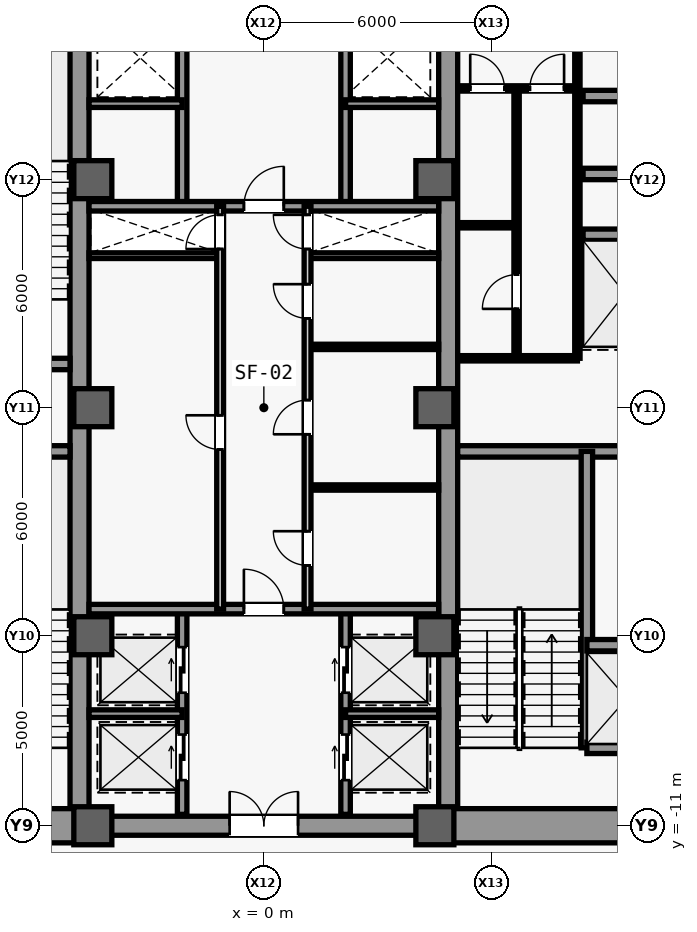
"""IFC4 building model, lengths in metres.
Left out: names, types, materials, properties, quantities, classifications, styles, units other than length and angle.
Written with IfcOpenShell. Run it as: python <this file> out.ifc"""

import sys

from ifc_helpers import new_model, si_unit, direction, frame, frame_2d, origin, origin_2d, place, context, subcontext, project, spatial, rectangle, extrude, source, transform, mapped, element, fill, save


model = new_model("IFC4")
c1 = context("Model", 3, precision=1e-05, world=origin(), true_north=direction((0.0, 1.0)))
c2 = subcontext(c1, "Body", "Model", "MODEL_VIEW")
j1 = project(units=[si_unit("LENGTHUNIT", "METRE"), si_unit("PLANEANGLEUNIT", "RADIAN")], contexts=[c1])
p1 = place(None, origin())
s1 = spatial("IfcSite", under=j1, at=p1, CompositionType="ELEMENT")
p2 = place(p1, origin())
s2 = spatial("IfcBuilding", under=s1, at=p2, CompositionType="ELEMENT")
p3 = place(p2, frame((0.0, 0.0, 17.4)))
s3 = spatial("IfcBuildingStorey", under=s2, at=p3, CompositionType="ELEMENT", Elevation=17.4)
m1 = source(origin(), c2, "Body", "SweptSolid", [
    extrude(rectangle(XDim=21.4, YDim=0.5, at=frame_2d((10.7, 0.0))), origin(), (0.0, 0.0, 1.0), 4.48),
])
for number, where, z_axis, x_axis in (
    (1, (-4.85, -10.7, 0.0), (0.0, 0.0, 1.0), (0.0, 1.0, 0.0)),
    (2, (4.85, -10.7, 0.0), (0.0, 0.0, 1.0), (0.0, 1.0, 0.0)),
):
    element("IfcWall", number, at=place(p3, frame(where, z_axis=z_axis, x_axis=x_axis)), inside=s3, PredefinedType="SHEAR", context=c2, shape_type="MappedRepresentation", body=[
        mapped(m1, transform((0.0, 0.0, 0.0), scale=1.0)),
    ])
m2 = source(origin(), c2, "Body", "SweptSolid", [
    extrude(rectangle(XDim=5.85, YDim=0.9, at=frame_2d((2.925, 0.0))), origin(), (0.0, 0.0, 1.0), 4.48),
])
for number, where, z_axis, x_axis in (
    (3, (-10.7, -11.0, 0.0), (0.0, 0.0, 1.0), (1.0, 0.0, 0.0)),
    (4, (4.85, -11.0, 0.0), (0.0, 0.0, 1.0), (1.0, 0.0, 0.0)),
):
    element("IfcWall", number, at=place(p3, frame(where, z_axis=z_axis, x_axis=x_axis)), inside=s3, PredefinedType="SHEAR", context=c2, shape_type="MappedRepresentation", body=[
        mapped(m2, transform((0.0, 0.0, 0.0), scale=1.0)),
    ])
m3 = source(origin(), c2, "Body", "SweptSolid", [
    extrude(rectangle(XDim=5.6, YDim=0.3, at=frame_2d((2.8, 0.0))), origin(), (0.0, 0.0, 1.0), 4.48),
])
for number, where, z_axis, x_axis in (
    (5, (-10.7, -1.15, 0.0), (0.0, 0.0, 1.0), (1.0, 0.0, 0.0)),
    (6, (-10.7, 1.15, 0.0), (0.0, 0.0, 1.0), (1.0, 0.0, 0.0)),
    (7, (5.1, -1.15, 0.0), (0.0, 0.0, 1.0), (1.0, 0.0, 0.0)),
):
    element("IfcWall", number, at=place(p3, frame(where, z_axis=z_axis, x_axis=x_axis)), inside=s3, PredefinedType="SHEAR", context=c2, shape_type="MappedRepresentation", body=[
        mapped(m3, transform((0.0, 0.0, 0.0), scale=1.0)),
    ])
m4 = source(origin(), c2, "Body", "SweptSolid", [
    extrude(rectangle(XDim=9.2, YDim=0.5, at=frame_2d((4.6, 0.0))), origin(), (0.0, 0.0, 1.0), 4.48),
])
p4 = place(p3, frame((-4.6, -11.0, 0.0), z_axis=(0.0, 0.0, 1.0), x_axis=(1.0, 0.0, 0.0)))
e8 = element("IfcWall", 8, at=p4, inside=s3, PredefinedType="SHEAR", context=c2, shape_type="MappedRepresentation", body=[
    mapped(m4, transform((0.0, 0.0, 0.0), scale=1.0)),
])
m5 = source(origin(), c2, "Body", "SweptSolid", [
    extrude(rectangle(XDim=1.8, YDim=2.25, at=frame_2d((0.9, 1.125))), frame((0.0, 0.26, 0.0), z_axis=(0.0, -1.0, 0.0), x_axis=(1.0, 0.0, 0.0)), (0.0, 0.0, 1.0), 0.52),
])
p5 = place(p4, frame((3.7, 0.0, 0.0)))
e9 = element("IfcOpeningElement", 9, at=p5, cuts=e8, PredefinedType="OPENING", context=c2, shape_type="MappedRepresentation", body=[
    mapped(m5, transform((0.0, 0.0, 0.0), scale=1.0)),
])
m6 = source(origin(), c2, "Body", "SweptSolid", [
    extrude(rectangle(XDim=1.0, YDim=1.0, at=origin_2d()), origin(), (0.0, 0.0, 1.0), 4.8),
])
for number, where, z_axis, x_axis in (
    (10, (-4.5, -11.0, 0.0), (0.0, 0.0, 1.0), (1.0, 0.0, 0.0)),
    (11, (-4.5, -6.0, 0.0), (0.0, 0.0, 1.0), (1.0, 0.0, 0.0)),
    (12, (-4.5, 0.0, 0.0), (0.0, 0.0, 1.0), (1.0, 0.0, 0.0)),
    (13, (-4.5, 6.0, 0.0), (0.0, 0.0, 1.0), (1.0, 0.0, 0.0)),
    (14, (4.5, -11.0, 0.0), (0.0, 0.0, 1.0), (1.0, 0.0, 0.0)),
    (15, (4.5, -6.0, 0.0), (0.0, 0.0, 1.0), (1.0, 0.0, 0.0)),
    (16, (4.5, 0.0, 0.0), (0.0, 0.0, 1.0), (1.0, 0.0, 0.0)),
    (17, (4.5, 6.0, 0.0), (0.0, 0.0, 1.0), (1.0, 0.0, 0.0)),
):
    element("IfcColumn", number, at=place(p3, frame(where, z_axis=z_axis, x_axis=x_axis)), inside=s3, PredefinedType="COLUMN", context=c2, shape_type="MappedRepresentation", body=[
        mapped(m6, transform((0.0, 0.0, 0.0), scale=1.0)),
    ])
m7 = source(origin(), c2, "Body", "SweptSolid", [
    extrude(rectangle(XDim=7.8, YDim=0.3, at=frame_2d((3.9, 0.0))), origin(), (0.0, 0.0, 1.0), 4.48),
])
p6 = place(p3, frame((8.5, -8.95, 0.0), z_axis=(0.0, 0.0, 1.0), x_axis=(0.0, 1.0, 0.0)))
e18 = element("IfcWall", 18, at=p6, inside=s3, PredefinedType="SHEAR", context=c2, shape_type="MappedRepresentation", body=[
    mapped(m7, transform((0.0, 0.0, 0.0), scale=1.0)),
])
m8 = source(origin(), c2, "Body", "SweptSolid", [
    extrude(rectangle(XDim=2.2, YDim=0.3, at=frame_2d((1.1, 0.0))), origin(), (0.0, 0.0, 1.0), 4.48),
])
for number, where, z_axis, x_axis in (
    (19, (8.5, -8.95, 0.0), (0.0, 0.0, 1.0), (1.0, 0.0, 0.0)),
    (20, (8.5, -6.25, 0.0), (0.0, 0.0, 1.0), (1.0, 0.0, 0.0)),
):
    element("IfcWall", number, at=place(p3, frame(where, z_axis=z_axis, x_axis=x_axis)), inside=s3, PredefinedType="SHEAR", context=c2, shape_type="MappedRepresentation", body=[
        mapped(m8, transform((0.0, 0.0, 0.0), scale=1.0)),
    ])
m9 = source(origin(), c2, "Body", "SweptSolid", [
    extrude(rectangle(XDim=2.3, YDim=0.3, at=frame_2d((1.15, 0.0))), origin(), (0.0, 0.0, 1.0), 4.48),
])
for number, where, z_axis, x_axis in (
    (21, (8.4, 4.55, 0.0), (0.0, 0.0, 1.0), (1.0, 0.0, 0.0)),
    (22, (8.4, 6.15, 0.0), (0.0, 0.0, 1.0), (1.0, 0.0, 0.0)),
    (23, (8.4, 8.2, 0.0), (0.0, 0.0, 1.0), (1.0, 0.0, 0.0)),
):
    element("IfcWall", number, at=place(p3, frame(where, z_axis=z_axis, x_axis=x_axis)), inside=s3, PredefinedType="SHEAR", context=c2, shape_type="MappedRepresentation", body=[
        mapped(m9, transform((0.0, 0.0, 0.0), scale=1.0)),
    ])
m10 = source(origin(), c2, "Body", "SweptSolid", [
    extrude(rectangle(XDim=9.4, YDim=0.14, at=frame_2d((4.7, 0.0))), origin(), (0.0, 0.0, 1.0), 4.48),
])
p7 = place(p3, frame((8.25, 1.3, 0.0), z_axis=(0.0, 0.0, 1.0), x_axis=(0.0, 1.0, 0.0)))
e24 = element("IfcWall", 24, at=p7, inside=s3, PredefinedType="PARTITIONING", context=c2, shape_type="MappedRepresentation", body=[
    mapped(m10, transform((0.0, 0.0, 0.0), scale=1.0)),
])
m11 = source(origin(), c2, "Body", "SweptSolid", [
    extrude(rectangle(XDim=3.15, YDim=0.14, at=frame_2d((1.575, 0.0))), origin(), (0.0, 0.0, 1.0), 4.48),
])
p8 = place(p3, frame((5.1, 1.3, 0.0), z_axis=(0.0, 0.0, 1.0), x_axis=(1.0, 0.0, 0.0)))
e25 = element("IfcWall", 25, at=p8, inside=s3, PredefinedType="PARTITIONING", context=c2, shape_type="MappedRepresentation", body=[
    mapped(m11, transform((0.0, 0.0, 0.0), scale=1.0)),
])
p9 = place(p3, frame((5.1, 8.4, 0.0), z_axis=(0.0, 0.0, 1.0), x_axis=(1.0, 0.0, 0.0)))
e26 = element("IfcWall", 26, at=p9, inside=s3, PredefinedType="PARTITIONING", context=c2, shape_type="MappedRepresentation", body=[
    mapped(m11, transform((0.0, 0.0, 0.0), scale=1.0)),
])
m12 = source(origin(), c2, "Body", "SweptSolid", [
    extrude(rectangle(XDim=0.9, YDim=2.15, at=frame_2d((0.45, 1.075))), frame((0.0, 0.08, 0.0), z_axis=(0.0, -1.0, 0.0), x_axis=(1.0, 0.0, 0.0)), (0.0, 0.0, 1.0), 0.16),
])
p10 = place(p9, frame((0.33, 0.0, 0.0)))
e27 = element("IfcOpeningElement", 27, at=p10, cuts=e26, PredefinedType="OPENING", context=c2, shape_type="MappedRepresentation", body=[
    mapped(m12, transform((0.0, 0.0, 0.0), scale=1.0)),
])
p11 = place(p9, frame((1.9, 0.0, 0.0)))
e28 = element("IfcOpeningElement", 28, at=p11, cuts=e26, PredefinedType="OPENING", context=c2, shape_type="MappedRepresentation", body=[
    mapped(m12, transform((0.0, 0.0, 0.0), scale=1.0)),
])
m13 = source(origin(), c2, "Body", "SweptSolid", [
    extrude(rectangle(XDim=7.1, YDim=0.14, at=frame_2d((3.55, 0.0))), origin(), (0.0, 0.0, 1.0), 4.48),
])
p12 = place(p3, frame((6.65, 1.3, 0.0), z_axis=(0.0, 0.0, 1.0), x_axis=(0.0, 1.0, 0.0)))
e29 = element("IfcWall", 29, at=p12, inside=s3, PredefinedType="PARTITIONING", context=c2, shape_type="MappedRepresentation", body=[
    mapped(m13, transform((0.0, 0.0, 0.0), scale=1.0)),
])
p13 = place(p12, frame((1.3, 0.0, 0.0)))
e30 = element("IfcOpeningElement", 30, at=p13, cuts=e29, PredefinedType="OPENING", context=c2, shape_type="MappedRepresentation", body=[
    mapped(m12, transform((0.0, 0.0, 0.0), scale=1.0)),
])
m14 = source(origin(), c2, "Body", "SweptSolid", [
    extrude(rectangle(XDim=1.55, YDim=0.14, at=frame_2d((0.775, 0.0))), origin(), (0.0, 0.0, 1.0), 4.48),
])
p14 = place(p3, frame((5.1, 4.8, 0.0), z_axis=(0.0, 0.0, 1.0), x_axis=(1.0, 0.0, 0.0)))
e31 = element("IfcWall", 31, at=p14, inside=s3, PredefinedType="PARTITIONING", context=c2, shape_type="MappedRepresentation", body=[
    mapped(m14, transform((0.0, 0.0, 0.0), scale=1.0)),
])
m15 = source(origin(), c2, "Body", "SweptSolid", [
    extrude(rectangle(XDim=3.45, YDim=0.15, at=frame_2d((1.725, 0.0))), origin(), (0.0, 0.0, 1.0), 4.48),
])
for number, where, z_axis, x_axis in (
    (32, (-4.6, 4.0, 0.0), (0.0, 0.0, 1.0), (1.0, 0.0, 0.0)),
    (33, (1.15, 4.0, 0.0), (0.0, 0.0, 1.0), (1.0, 0.0, 0.0)),
):
    element("IfcWall", number, at=place(p3, frame(where, z_axis=z_axis, x_axis=x_axis)), inside=s3, PredefinedType="PARTITIONING", context=c2, shape_type="MappedRepresentation", body=[
        mapped(m15, transform((0.0, 0.0, 0.0), scale=1.0)),
    ])
m16 = source(origin(), c2, "Body", "SweptSolid", [
    extrude(rectangle(XDim=5.4, YDim=0.25, at=frame_2d((2.7, 0.0))), origin(), (0.0, 0.0, 1.0), 4.48),
])
p15 = place(p3, frame((-2.15, -10.7, 0.0), z_axis=(0.0, 0.0, 1.0), x_axis=(0.0, 1.0, 0.0)))
e34 = element("IfcWall", 34, at=p15, inside=s3, PredefinedType="SHEAR", context=c2, shape_type="MappedRepresentation", body=[
    mapped(m16, transform((0.0, 0.0, 0.0), scale=1.0)),
])
m17 = source(origin(), c2, "Body", "SweptSolid", [
    extrude(rectangle(XDim=1.2, YDim=2.3, at=frame_2d((0.6, 1.15))), frame((0.0, 0.135, 0.0), z_axis=(0.0, -1.0, 0.0), x_axis=(1.0, 0.0, 0.0)), (0.0, 0.0, 1.0), 0.27),
])
p16 = place(p15, frame((0.9, 0.0, 0.0)))
e35 = element("IfcOpeningElement", 35, at=p16, cuts=e34, PredefinedType="OPENING", context=c2, shape_type="MappedRepresentation", body=[
    mapped(m17, transform((0.0, 0.0, 0.0), scale=1.0)),
])
p17 = place(p15, frame((3.2, 0.0, 0.0)))
e36 = element("IfcOpeningElement", 36, at=p17, cuts=e34, PredefinedType="OPENING", context=c2, shape_type="MappedRepresentation", body=[
    mapped(m17, transform((0.0, 0.0, 0.0), scale=1.0)),
])
p18 = place(p3, frame((2.15, -10.7, 0.0), z_axis=(0.0, 0.0, 1.0), x_axis=(0.0, 1.0, 0.0)))
e37 = element("IfcWall", 37, at=p18, inside=s3, PredefinedType="SHEAR", context=c2, shape_type="MappedRepresentation", body=[
    mapped(m16, transform((0.0, 0.0, 0.0), scale=1.0)),
])
p19 = place(p18, frame((0.9, 0.0, 0.0)))
e38 = element("IfcOpeningElement", 38, at=p19, cuts=e37, PredefinedType="OPENING", context=c2, shape_type="MappedRepresentation", body=[
    mapped(m17, transform((0.0, 0.0, 0.0), scale=1.0)),
])
p20 = place(p18, frame((3.2, 0.0, 0.0)))
e39 = element("IfcOpeningElement", 39, at=p20, cuts=e37, PredefinedType="OPENING", context=c2, shape_type="MappedRepresentation", body=[
    mapped(m17, transform((0.0, 0.0, 0.0), scale=1.0)),
])
m18 = source(origin(), c2, "Body", "SweptSolid", [
    extrude(rectangle(XDim=2.45, YDim=0.2, at=frame_2d((1.225, 0.0))), origin(), (0.0, 0.0, 1.0), 4.48),
])
for number, where, z_axis, x_axis in (
    (40, (-4.6, -8.05, 0.0), (0.0, 0.0, 1.0), (1.0, 0.0, 0.0)),
    (41, (2.15, -8.05, 0.0), (0.0, 0.0, 1.0), (1.0, 0.0, 0.0)),
):
    element("IfcWall", number, at=place(p3, frame(where, z_axis=z_axis, x_axis=x_axis)), inside=s3, PredefinedType="SHEAR", context=c2, shape_type="MappedRepresentation", body=[
        mapped(m18, transform((0.0, 0.0, 0.0), scale=1.0)),
    ])
m19 = source(origin(), c2, "Body", "SweptSolid", [
    extrude(rectangle(XDim=9.2, YDim=0.25, at=frame_2d((4.6, 0.0))), origin(), (0.0, 0.0, 1.0), 4.48),
])
p21 = place(p3, frame((-4.6, -5.3, 0.0), z_axis=(0.0, 0.0, 1.0), x_axis=(1.0, 0.0, 0.0)))
e42 = element("IfcWall", 42, at=p21, inside=s3, PredefinedType="SHEAR", context=c2, shape_type="MappedRepresentation", body=[
    mapped(m19, transform((0.0, 0.0, 0.0), scale=1.0)),
])
m20 = source(origin(), c2, "Body", "SweptSolid", [
    extrude(rectangle(XDim=1.05, YDim=2.2, at=frame_2d((0.525, 1.1))), frame((0.0, 0.135, 0.0), z_axis=(0.0, -1.0, 0.0), x_axis=(1.0, 0.0, 0.0)), (0.0, 0.0, 1.0), 0.27),
])
p22 = place(p21, frame((4.075, 0.0, 0.0)))
e43 = element("IfcOpeningElement", 43, at=p22, cuts=e42, PredefinedType="OPENING", context=c2, shape_type="MappedRepresentation", body=[
    mapped(m20, transform((0.0, 0.0, 0.0), scale=1.0)),
])
for number, where, z_axis, x_axis in (
    (44, (-2.15, 5.3, 0.0), (0.0, 0.0, 1.0), (0.0, 1.0, 0.0)),
    (45, (2.15, 5.3, 0.0), (0.0, 0.0, 1.0), (0.0, 1.0, 0.0)),
):
    element("IfcWall", number, at=place(p3, frame(where, z_axis=z_axis, x_axis=x_axis)), inside=s3, PredefinedType="SHEAR", context=c2, shape_type="MappedRepresentation", body=[
        mapped(m16, transform((0.0, 0.0, 0.0), scale=1.0)),
    ])
for number, where, z_axis, x_axis in (
    (46, (-4.6, 8.0, 0.0), (0.0, 0.0, 1.0), (1.0, 0.0, 0.0)),
    (47, (2.15, 8.0, 0.0), (0.0, 0.0, 1.0), (1.0, 0.0, 0.0)),
):
    element("IfcWall", number, at=place(p3, frame(where, z_axis=z_axis, x_axis=x_axis)), inside=s3, PredefinedType="SHEAR", context=c2, shape_type="MappedRepresentation", body=[
        mapped(m18, transform((0.0, 0.0, 0.0), scale=1.0)),
    ])
p23 = place(p3, frame((-4.6, 5.3, 0.0), z_axis=(0.0, 0.0, 1.0), x_axis=(1.0, 0.0, 0.0)))
e48 = element("IfcWall", 48, at=p23, inside=s3, PredefinedType="SHEAR", context=c2, shape_type="MappedRepresentation", body=[
    mapped(m19, transform((0.0, 0.0, 0.0), scale=1.0)),
])
p24 = place(p23, frame((4.075, 0.0, 0.0)))
e49 = element("IfcOpeningElement", 49, at=p24, cuts=e48, PredefinedType="OPENING", context=c2, shape_type="MappedRepresentation", body=[
    mapped(m20, transform((0.0, 0.0, 0.0), scale=1.0)),
])
m21 = source(origin(), c2, "Body", "SweptSolid", [
    extrude(rectangle(XDim=10.6, YDim=0.18, at=frame_2d((5.3, 0.0))), origin(), (0.0, 0.0, 1.0), 4.48),
])
p25 = place(p3, frame((-1.15, -5.3, 0.0), z_axis=(0.0, 0.0, 1.0), x_axis=(0.0, 1.0, 0.0)))
e50 = element("IfcWall", 50, at=p25, inside=s3, PredefinedType="PARTITIONING", context=c2, shape_type="MappedRepresentation", body=[
    mapped(m21, transform((0.0, 0.0, 0.0), scale=1.0)),
])
m22 = source(origin(), c2, "Body", "SweptSolid", [
    extrude(rectangle(XDim=0.9, YDim=2.15, at=frame_2d((0.45, 1.075))), frame((0.0, 0.1, 0.0), z_axis=(0.0, -1.0, 0.0), x_axis=(1.0, 0.0, 0.0)), (0.0, 0.0, 1.0), 0.2),
])
p26 = place(p25, frame((4.2, 0.0, 0.0)))
e51 = element("IfcOpeningElement", 51, at=p26, cuts=e50, PredefinedType="OPENING", context=c2, shape_type="MappedRepresentation", body=[
    mapped(m22, transform((0.0, 0.0, 0.0), scale=1.0)),
])
p27 = place(p25, frame((9.475, 0.0, 0.0)))
e52 = element("IfcOpeningElement", 52, at=p27, cuts=e50, PredefinedType="OPENING", context=c2, shape_type="MappedRepresentation", body=[
    mapped(m22, transform((0.0, 0.0, 0.0), scale=1.0)),
])
m23 = source(origin(), c2, "Body", "SweptSolid", [
    extrude(rectangle(XDim=3.45, YDim=0.14, at=frame_2d((1.725, 0.0))), origin(), (0.0, 0.0, 1.0), 4.48),
])
for number, where, z_axis, x_axis in (
    (53, (1.15, -2.1, 0.0), (0.0, 0.0, 1.0), (1.0, 0.0, 0.0)),
    (54, (1.15, 1.6, 0.0), (0.0, 0.0, 1.0), (1.0, 0.0, 0.0)),
):
    element("IfcWall", number, at=place(p3, frame(where, z_axis=z_axis, x_axis=x_axis)), inside=s3, PredefinedType="PARTITIONING", context=c2, shape_type="MappedRepresentation", body=[
        mapped(m23, transform((0.0, 0.0, 0.0), scale=1.0)),
    ])
p28 = place(p3, frame((1.15, -5.3, 0.0), z_axis=(0.0, 0.0, 1.0), x_axis=(0.0, 1.0, 0.0)))
e55 = element("IfcWall", 55, at=p28, inside=s3, PredefinedType="PARTITIONING", context=c2, shape_type="MappedRepresentation", body=[
    mapped(m21, transform((0.0, 0.0, 0.0), scale=1.0)),
])
p29 = place(p28, frame((1.15, 0.0, 0.0)))
e56 = element("IfcOpeningElement", 56, at=p29, cuts=e55, PredefinedType="OPENING", context=c2, shape_type="MappedRepresentation", body=[
    mapped(m22, transform((0.0, 0.0, 0.0), scale=1.0)),
])
p30 = place(p28, frame((4.6, 0.0, 0.0)))
e57 = element("IfcOpeningElement", 57, at=p30, cuts=e55, PredefinedType="OPENING", context=c2, shape_type="MappedRepresentation", body=[
    mapped(m22, transform((0.0, 0.0, 0.0), scale=1.0)),
])
p31 = place(p28, frame((7.65, 0.0, 0.0)))
e58 = element("IfcOpeningElement", 58, at=p31, cuts=e55, PredefinedType="OPENING", context=c2, shape_type="MappedRepresentation", body=[
    mapped(m22, transform((0.0, 0.0, 0.0), scale=1.0)),
])
p32 = place(p28, frame((9.475, 0.0, 0.0)))
e59 = element("IfcOpeningElement", 59, at=p32, cuts=e55, PredefinedType="OPENING", context=c2, shape_type="MappedRepresentation", body=[
    mapped(m22, transform((0.0, 0.0, 0.0), scale=1.0)),
])
m24 = source(origin(), c2, "Body", "SweptSolid", [
    extrude(rectangle(XDim=0.9, YDim=2.15, at=frame_2d((0.45, 1.075))), frame((0.0, 0.025, 0.0), z_axis=(0.0, -1.0, 0.0), x_axis=(1.0, 0.0, 0.0)), (0.0, 0.0, 1.0), 0.05),
])
p33 = place(p10, origin())
e60 = element("IfcDoor", 60, at=p33, inside=s3, OperationType="SINGLE_SWING_LEFT", PredefinedType="DOOR", context=c2, shape_type="MappedRepresentation", body=[
    mapped(m24, transform((0.0, 0.0, 0.0), scale=1.0)),
])
fill(e27, e60)
p34 = place(p11, origin())
e61 = element("IfcDoor", 61, at=p34, inside=s3, OperationType="SINGLE_SWING_RIGHT", PredefinedType="DOOR", context=c2, shape_type="MappedRepresentation", body=[
    mapped(m24, transform((0.0, 0.0, 0.0), scale=1.0)),
])
fill(e28, e61)
p35 = place(p13, origin())
e62 = element("IfcDoor", 62, at=p35, inside=s3, OperationType="SINGLE_SWING_LEFT", PredefinedType="DOOR", context=c2, shape_type="MappedRepresentation", body=[
    mapped(m24, transform((0.0, 0.0, 0.0), scale=1.0)),
])
fill(e30, e62)
m25 = source(origin(), c2, "Body", "SweptSolid", [
    extrude(rectangle(XDim=1.05, YDim=2.2, at=frame_2d((0.525, 1.1))), frame((0.0, 0.025, 0.0), z_axis=(0.0, -1.0, 0.0), x_axis=(1.0, 0.0, 0.0)), (0.0, 0.0, 1.0), 0.05),
])
p36 = place(p22, origin())
e63 = element("IfcDoor", 63, at=p36, inside=s3, OperationType="SINGLE_SWING_LEFT", PredefinedType="DOOR", context=c2, shape_type="MappedRepresentation", body=[
    mapped(m25, transform((0.0, 0.0, 0.0), scale=1.0)),
])
fill(e43, e63)
m26 = source(origin(), c2, "Body", "SweptSolid", [
    extrude(rectangle(XDim=1.8, YDim=2.25, at=frame_2d((0.9, 1.125))), frame((0.0, 0.025, 0.0), z_axis=(0.0, -1.0, 0.0), x_axis=(1.0, 0.0, 0.0)), (0.0, 0.0, 1.0), 0.05),
])
p37 = place(p5, origin())
e64 = element("IfcDoor", 64, at=p37, inside=s3, OperationType="SINGLE_SWING_LEFT", PredefinedType="DOOR", context=c2, shape_type="MappedRepresentation", body=[
    mapped(m26, transform((0.0, 0.0, 0.0), scale=1.0)),
])
fill(e9, e64)
p38 = place(p24, origin())
e65 = element("IfcDoor", 65, at=p38, inside=s3, OperationType="SINGLE_SWING_RIGHT", PredefinedType="DOOR", context=c2, shape_type="MappedRepresentation", body=[
    mapped(m25, transform((0.0, 0.0, 0.0), scale=1.0)),
])
fill(e49, e65)
p39 = place(p26, origin())
e66 = element("IfcDoor", 66, at=p39, inside=s3, OperationType="SINGLE_SWING_RIGHT", PredefinedType="DOOR", context=c2, shape_type="MappedRepresentation", body=[
    mapped(m24, transform((0.0, 0.0, 0.0), scale=1.0)),
])
fill(e51, e66)
p40 = place(p29, origin())
e67 = element("IfcDoor", 67, at=p40, inside=s3, OperationType="SINGLE_SWING_RIGHT", PredefinedType="DOOR", context=c2, shape_type="MappedRepresentation", body=[
    mapped(m24, transform((0.0, 0.0, 0.0), scale=1.0)),
])
fill(e56, e67)
p41 = place(p30, origin())
e68 = element("IfcDoor", 68, at=p41, inside=s3, OperationType="SINGLE_SWING_LEFT", PredefinedType="DOOR", context=c2, shape_type="MappedRepresentation", body=[
    mapped(m24, transform((0.0, 0.0, 0.0), scale=1.0)),
])
fill(e57, e68)
p42 = place(p31, origin())
e69 = element("IfcDoor", 69, at=p42, inside=s3, OperationType="SINGLE_SWING_RIGHT", PredefinedType="DOOR", context=c2, shape_type="MappedRepresentation", body=[
    mapped(m24, transform((0.0, 0.0, 0.0), scale=1.0)),
])
fill(e58, e69)
p43 = place(p27, origin())
e70 = element("IfcDoor", 70, at=p43, inside=s3, OperationType="SINGLE_SWING_LEFT", PredefinedType="DOOR", context=c2, shape_type="MappedRepresentation", body=[
    mapped(m24, transform((0.0, 0.0, 0.0), scale=1.0)),
])
fill(e52, e70)
p44 = place(p32, origin())
e71 = element("IfcDoor", 71, at=p44, inside=s3, OperationType="SINGLE_SWING_RIGHT", PredefinedType="DOOR", context=c2, shape_type="MappedRepresentation", body=[
    mapped(m24, transform((0.0, 0.0, 0.0), scale=1.0)),
])
fill(e59, e71)
m27 = source(origin(), c2, "Body", "SweptSolid", [
    extrude(rectangle(XDim=1.2, YDim=2.3, at=frame_2d((0.6, 1.15))), frame((0.0, 0.025, 0.0), z_axis=(0.0, -1.0, 0.0), x_axis=(1.0, 0.0, 0.0)), (0.0, 0.0, 1.0), 0.05),
])
p45 = place(p16, origin())
e72 = element("IfcDoor", 72, at=p45, inside=s3, OperationType="SLIDING_TO_LEFT", PredefinedType="DOOR", context=c2, shape_type="MappedRepresentation", body=[
    mapped(m27, transform((0.0, 0.0, 0.0), scale=1.0)),
])
fill(e35, e72)
p46 = place(p19, origin())
e73 = element("IfcDoor", 73, at=p46, inside=s3, OperationType="SLIDING_TO_LEFT", PredefinedType="DOOR", context=c2, shape_type="MappedRepresentation", body=[
    mapped(m27, transform((0.0, 0.0, 0.0), scale=1.0)),
])
fill(e38, e73)
p47 = place(p17, origin())
e74 = element("IfcDoor", 74, at=p47, inside=s3, OperationType="SLIDING_TO_LEFT", PredefinedType="DOOR", context=c2, shape_type="MappedRepresentation", body=[
    mapped(m27, transform((0.0, 0.0, 0.0), scale=1.0)),
])
fill(e36, e74)
p48 = place(p20, origin())
e75 = element("IfcDoor", 75, at=p48, inside=s3, OperationType="SLIDING_TO_LEFT", PredefinedType="DOOR", context=c2, shape_type="MappedRepresentation", body=[
    mapped(m27, transform((0.0, 0.0, 0.0), scale=1.0)),
])
fill(e39, e75)
save(model, sys.argv[1])
